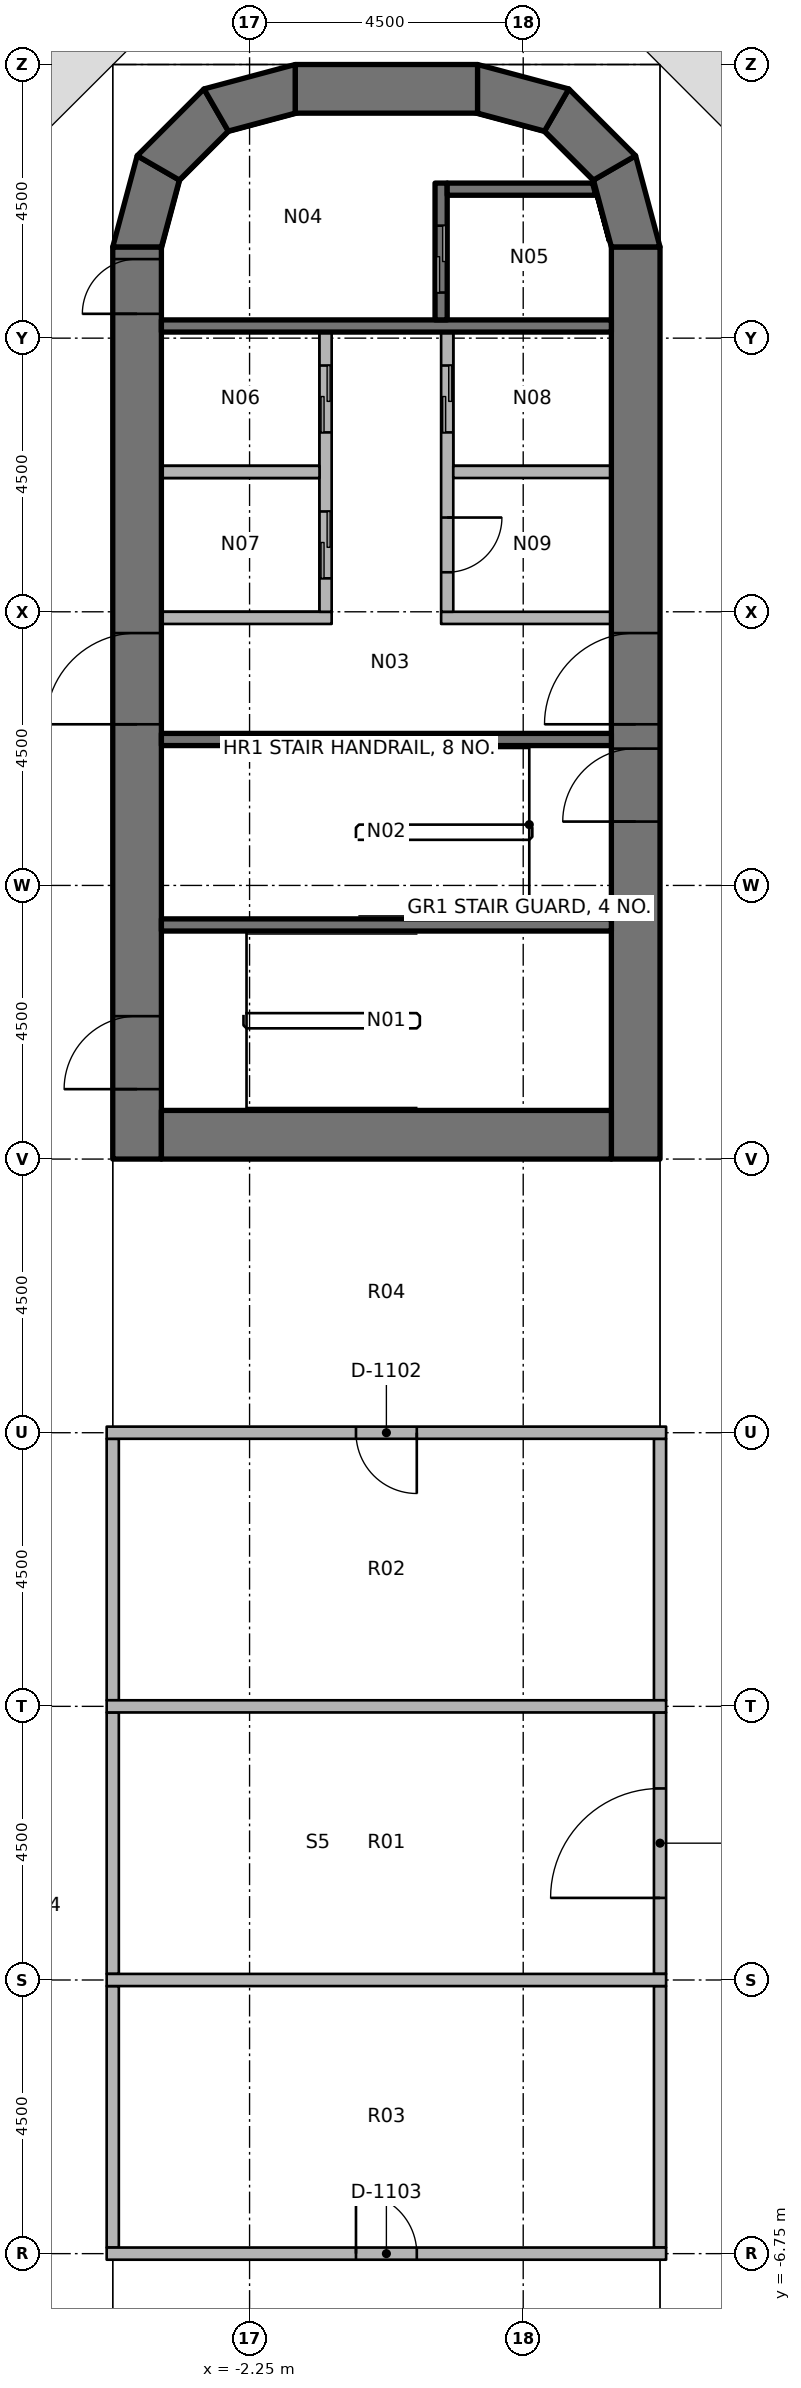
"""IFC4 building model, lengths in metres.
Left out: names, types, materials, properties, quantities, classifications, styles, units other than length and angle.
Written with IfcOpenShell. Run it as: python <this file> out.ifc"""

import sys

from ifc_helpers import new_model, si_unit, direction, frame, frame_2d, origin, place, context, subcontext, project, spatial, polyline, rectangle, outline, extrude, element, fill, save


model = new_model("IFC4")
c1 = context("Model", 3, precision=1e-05, world=origin(), true_north=direction((0.0, 1.0)))
c2 = subcontext(c1, "Body", "Model", "MODEL_VIEW")
j1 = project(units=[si_unit("LENGTHUNIT", "METRE"), si_unit("PLANEANGLEUNIT", "RADIAN")], contexts=[c1])
p1 = place(None, origin())
s1 = spatial("IfcSite", under=j1, at=p1, CompositionType="ELEMENT")
p2 = place(p1, origin())
s2 = spatial("IfcBuilding", under=s1, at=p2, CompositionType="ELEMENT")
p3 = place(p2, frame((0.0, 0.0, 124.6)))
s3 = spatial("IfcBuildingStorey", under=s2, at=p3, CompositionType="ELEMENT", Elevation=124.6)
p4 = place(p3, frame((-4.1, 11.25, 0.0), z_axis=(0.0, 0.0, 1.0), x_axis=(0.0, 1.0, 0.0)))
e1 = element("IfcWall", 1, at=p4, inside=s3, PredefinedType="SHEAR", context=c2, shape_type="SweptSolid", body=[
    extrude(rectangle(XDim=15.0, YDim=0.8, at=frame_2d((7.5, 0.0))), origin(), (0.0, 0.0, 1.0), 3.8),
])
p5 = place(p4, frame((7.15, 0.0, 0.0)))
e2 = element("IfcOpeningElement", 2, at=p5, cuts=e1, PredefinedType="OPENING", context=c2, shape_type="SweptSolid", body=[
    extrude(rectangle(XDim=1.5, YDim=2.3, at=frame_2d((0.75, 1.15))), frame((0.0, 0.41, 0.0), z_axis=(0.0, -1.0, 0.0), x_axis=(1.0, 0.0, 0.0)), (0.0, 0.0, 1.0), 0.82),
])
p6 = place(p4, frame((13.9, 0.0, 0.0)))
e3 = element("IfcOpeningElement", 3, at=p6, cuts=e1, PredefinedType="OPENING", context=c2, shape_type="SweptSolid", body=[
    extrude(rectangle(XDim=0.9, YDim=2.1, at=frame_2d((0.45, 1.05))), frame((0.0, 0.41, 0.0), z_axis=(0.0, -1.0, 0.0), x_axis=(1.0, 0.0, 0.0)), (0.0, 0.0, 1.0), 0.82),
])
p7 = place(p4, frame((1.15, 0.0, 0.0)))
e4 = element("IfcOpeningElement", 4, at=p7, cuts=e1, PredefinedType="OPENING", context=c2, shape_type="SweptSolid", body=[
    extrude(rectangle(XDim=1.2, YDim=2.1, at=frame_2d((0.6, 1.05))), frame((0.0, 0.41, 0.0), z_axis=(0.0, -1.0, 0.0), x_axis=(1.0, 0.0, 0.0)), (0.0, 0.0, 1.0), 0.82),
])
p8 = place(p3, frame((4.1, 11.25, 0.0), z_axis=(0.0, 0.0, 1.0), x_axis=(0.0, 1.0, 0.0)))
e5 = element("IfcWall", 5, at=p8, inside=s3, PredefinedType="SHEAR", context=c2, shape_type="SweptSolid", body=[
    extrude(rectangle(XDim=15.0, YDim=0.8, at=frame_2d((7.5, 0.0))), origin(), (0.0, 0.0, 1.0), 3.8),
])
p9 = place(p8, frame((7.15, 0.0, 0.0)))
e6 = element("IfcOpeningElement", 6, at=p9, cuts=e5, PredefinedType="OPENING", context=c2, shape_type="SweptSolid", body=[
    extrude(rectangle(XDim=1.5, YDim=2.3, at=frame_2d((0.75, 1.15))), frame((0.0, 0.41, 0.0), z_axis=(0.0, -1.0, 0.0), x_axis=(1.0, 0.0, 0.0)), (0.0, 0.0, 1.0), 0.82),
])
p10 = place(p8, frame((5.55, 0.0, 0.0)))
e7 = element("IfcOpeningElement", 7, at=p10, cuts=e5, PredefinedType="OPENING", context=c2, shape_type="SweptSolid", body=[
    extrude(rectangle(XDim=1.2, YDim=2.1, at=frame_2d((0.6, 1.05))), frame((0.0, 0.41, 0.0), z_axis=(0.0, -1.0, 0.0), x_axis=(1.0, 0.0, 0.0)), (0.0, 0.0, 1.0), 0.82),
])
p11 = place(p3, frame((-3.7, 11.65, 0.0), z_axis=(0.0, 0.0, 1.0), x_axis=(1.0, 0.0, 0.0)))
e8 = element("IfcWall", 8, at=p11, inside=s3, PredefinedType="SHEAR", context=c2, shape_type="SweptSolid", body=[
    extrude(rectangle(XDim=7.4, YDim=0.8, at=frame_2d((3.7, 0.0))), origin(), (0.0, 0.0, 1.0), 3.8),
])
p12 = place(p3, frame((-1.5, 28.85, 0.0), z_axis=(0.0, 0.0, 1.0), x_axis=(1.0, 0.0, 0.0)))
e9 = element("IfcWall", 9, at=p12, inside=s3, PredefinedType="SHEAR", context=c2, shape_type="SweptSolid", body=[
    extrude(rectangle(XDim=3.0, YDim=0.8, at=frame_2d((1.5, 0.0))), origin(), (0.0, 0.0, 1.0), 3.8),
])
p13 = place(p3, origin())
e10 = element("IfcWall", 10, at=p13, inside=s3, PredefinedType="SHEAR", context=c2, shape_type="SweptSolid", body=[
    extrude(outline(polyline([(-4.5, 26.25), (-4.098, 27.75), (-3.405, 27.35), (-3.7, 26.25), (-4.5, 26.25)])), origin(), (0.0, 0.0, 1.0), 3.8),
])
p14 = place(p3, origin())
e11 = element("IfcWall", 11, at=p14, inside=s3, PredefinedType="SHEAR", context=c2, shape_type="SweptSolid", body=[
    extrude(outline(polyline([(-4.098, 27.75), (-3.0, 28.848), (-2.6, 28.155), (-3.405, 27.35), (-4.098, 27.75)])), origin(), (0.0, 0.0, 1.0), 3.8),
])
p15 = place(p3, origin())
e12 = element("IfcWall", 12, at=p15, inside=s3, PredefinedType="SHEAR", context=c2, shape_type="SweptSolid", body=[
    extrude(outline(polyline([(-3.0, 28.848), (-1.5, 29.25), (-1.5, 28.45), (-2.6, 28.155), (-3.0, 28.848)])), origin(), (0.0, 0.0, 1.0), 3.8),
])
p16 = place(p3, origin())
e13 = element("IfcWall", 13, at=p16, inside=s3, PredefinedType="SHEAR", context=c2, shape_type="SweptSolid", body=[
    extrude(outline(polyline([(4.5, 26.25), (4.098, 27.75), (3.405, 27.35), (3.7, 26.25), (4.5, 26.25)])), origin(), (0.0, 0.0, 1.0), 3.8),
])
p17 = place(p3, origin())
e14 = element("IfcWall", 14, at=p17, inside=s3, PredefinedType="SHEAR", context=c2, shape_type="SweptSolid", body=[
    extrude(outline(polyline([(4.098, 27.75), (3.0, 28.848), (2.6, 28.155), (3.405, 27.35), (4.098, 27.75)])), origin(), (0.0, 0.0, 1.0), 3.8),
])
p18 = place(p3, origin())
e15 = element("IfcWall", 15, at=p18, inside=s3, PredefinedType="SHEAR", context=c2, shape_type="SweptSolid", body=[
    extrude(outline(polyline([(3.0, 28.848), (1.5, 29.25), (1.5, 28.45), (2.6, 28.155), (3.0, 28.848)])), origin(), (0.0, 0.0, 1.0), 3.8),
])
p19 = place(p3, frame((-3.7, 24.95, 0.0), z_axis=(0.0, 0.0, 1.0), x_axis=(1.0, 0.0, 0.0)))
e16 = element("IfcWall", 16, at=p19, inside=s3, PredefinedType="SHEAR", context=c2, shape_type="SweptSolid", body=[
    extrude(rectangle(XDim=7.4, YDim=0.2, at=frame_2d((3.7, 0.0))), origin(), (0.0, 0.0, 1.0), 3.65),
])
p20 = place(p3, frame((0.9, 27.3, 0.0), z_axis=(0.0, 0.0, 1.0), x_axis=(0.0, -1.0, 0.0)))
e17 = element("IfcWall", 17, at=p20, inside=s3, PredefinedType="SHEAR", context=c2, shape_type="SweptSolid", body=[
    extrude(rectangle(XDim=2.25, YDim=0.2, at=frame_2d((1.125, 0.0))), origin(), (0.0, 0.0, 1.0), 3.65),
])
p21 = place(p20, frame((0.7, 0.0, 0.0)))
e18 = element("IfcOpeningElement", 18, at=p21, cuts=e17, PredefinedType="OPENING", context=c2, shape_type="SweptSolid", body=[
    extrude(rectangle(XDim=1.1, YDim=2.3, at=frame_2d((0.55, 1.15))), frame((0.0, 0.11, 0.0), z_axis=(0.0, -1.0, 0.0), x_axis=(1.0, 0.0, 0.0)), (0.0, 0.0, 1.0), 0.22),
])
p22 = place(p3, origin())
e19 = element("IfcWall", 19, at=p22, inside=s3, PredefinedType="SHEAR", context=c2, shape_type="SweptSolid", body=[
    extrude(outline(polyline([(1.0, 27.1), (3.444, 27.1), (3.39, 27.3), (1.0, 27.3), (1.0, 27.1)])), origin(), (0.0, 0.0, 1.0), 3.65),
])
for number, where, z_axis, x_axis in (
    (20, (-3.7, 18.15, 0.0), (0.0, 0.0, 1.0), (1.0, 0.0, 0.0)),
    (21, (-3.7, 15.1, 0.0), (0.0, 0.0, 1.0), (1.0, 0.0, 0.0)),
):
    element("IfcWall", number, at=place(p3, frame(where, z_axis=z_axis, x_axis=x_axis)), inside=s3, PredefinedType="SHEAR", context=c2, shape_type="SweptSolid", body=[
        extrude(rectangle(XDim=7.4, YDim=0.2, at=frame_2d((3.7, 0.0))), origin(), (0.0, 0.0, 1.0), 3.65),
    ])
p23 = place(p3, frame((-3.7, 20.15, 0.0), z_axis=(0.0, 0.0, 1.0), x_axis=(1.0, 0.0, 0.0)))
e22 = element("IfcWall", 22, at=p23, inside=s3, PredefinedType="PARTITIONING", context=c2, shape_type="SweptSolid", body=[
    extrude(rectangle(XDim=2.8, YDim=0.2, at=frame_2d((1.4, 0.0))), origin(), (0.0, 0.0, 1.0), 3.65),
])
p24 = place(p3, frame((-1.0, 24.85, 0.0), z_axis=(0.0, 0.0, 1.0), x_axis=(0.0, -1.0, 0.0)))
e23 = element("IfcWall", 23, at=p24, inside=s3, PredefinedType="PARTITIONING", context=c2, shape_type="SweptSolid", body=[
    extrude(rectangle(XDim=4.6, YDim=0.2, at=frame_2d((2.3, 0.0))), origin(), (0.0, 0.0, 1.0), 3.65),
])
p25 = place(p24, frame((0.55, 0.0, 0.0)))
e24 = element("IfcOpeningElement", 24, at=p25, cuts=e23, PredefinedType="OPENING", context=c2, shape_type="SweptSolid", body=[
    extrude(rectangle(XDim=1.1, YDim=2.3, at=frame_2d((0.55, 1.15))), frame((0.0, 0.11, 0.0), z_axis=(0.0, -1.0, 0.0), x_axis=(1.0, 0.0, 0.0)), (0.0, 0.0, 1.0), 0.22),
])
p26 = place(p24, frame((2.95, 0.0, 0.0)))
e25 = element("IfcOpeningElement", 25, at=p26, cuts=e23, PredefinedType="OPENING", context=c2, shape_type="SweptSolid", body=[
    extrude(rectangle(XDim=1.1, YDim=2.3, at=frame_2d((0.55, 1.15))), frame((0.0, 0.11, 0.0), z_axis=(0.0, -1.0, 0.0), x_axis=(1.0, 0.0, 0.0)), (0.0, 0.0, 1.0), 0.22),
])
p27 = place(p3, frame((0.9, 20.15, 0.0), z_axis=(0.0, 0.0, 1.0), x_axis=(1.0, 0.0, 0.0)))
e26 = element("IfcWall", 26, at=p27, inside=s3, PredefinedType="PARTITIONING", context=c2, shape_type="SweptSolid", body=[
    extrude(rectangle(XDim=2.8, YDim=0.2, at=frame_2d((1.4, 0.0))), origin(), (0.0, 0.0, 1.0), 3.65),
])
p28 = place(p3, frame((1.0, 24.85, 0.0), z_axis=(0.0, 0.0, 1.0), x_axis=(0.0, -1.0, 0.0)))
e27 = element("IfcWall", 27, at=p28, inside=s3, PredefinedType="PARTITIONING", context=c2, shape_type="SweptSolid", body=[
    extrude(rectangle(XDim=4.6, YDim=0.2, at=frame_2d((2.3, 0.0))), origin(), (0.0, 0.0, 1.0), 3.65),
])
p29 = place(p28, frame((0.55, 0.0, 0.0)))
e28 = element("IfcOpeningElement", 28, at=p29, cuts=e27, PredefinedType="OPENING", context=c2, shape_type="SweptSolid", body=[
    extrude(rectangle(XDim=1.1, YDim=2.3, at=frame_2d((0.55, 1.15))), frame((0.0, 0.11, 0.0), z_axis=(0.0, -1.0, 0.0), x_axis=(1.0, 0.0, 0.0)), (0.0, 0.0, 1.0), 0.22),
])
p30 = place(p28, frame((3.05, 0.0, 0.0)))
e29 = element("IfcOpeningElement", 29, at=p30, cuts=e27, PredefinedType="OPENING", context=c2, shape_type="SweptSolid", body=[
    extrude(rectangle(XDim=0.9, YDim=2.1, at=frame_2d((0.45, 1.05))), frame((0.0, 0.11, 0.0), z_axis=(0.0, -1.0, 0.0), x_axis=(1.0, 0.0, 0.0)), (0.0, 0.0, 1.0), 0.22),
])
for number, where, z_axis, x_axis in (
    (30, (-3.7, 22.55, 0.0), (0.0, 0.0, 1.0), (1.0, 0.0, 0.0)),
    (31, (1.1, 22.55, 0.0), (0.0, 0.0, 1.0), (1.0, 0.0, 0.0)),
):
    element("IfcWall", number, at=place(p3, frame(where, z_axis=z_axis, x_axis=x_axis)), inside=s3, PredefinedType="PARTITIONING", context=c2, shape_type="SweptSolid", body=[
        extrude(rectangle(XDim=2.6, YDim=0.2, at=frame_2d((1.3, 0.0))), origin(), (0.0, 0.0, 1.0), 3.65),
    ])
for number, where, z_axis, x_axis in (
    (32, (-4.5, 2.35, 0.0), (0.0, 0.0, 1.0), (0.0, 1.0, 0.0)),
    (33, (-4.5, -2.15, 0.0), (0.0, 0.0, 1.0), (0.0, 1.0, 0.0)),
    (34, (-4.5, -6.65, 0.0), (0.0, 0.0, 1.0), (0.0, 1.0, 0.0)),
    (35, (4.5, 2.35, 0.0), (0.0, 0.0, 1.0), (0.0, 1.0, 0.0)),
):
    element("IfcWall", number, at=place(p3, frame(where, z_axis=z_axis, x_axis=x_axis)), inside=s3, PredefinedType="PARTITIONING", context=c2, shape_type="SweptSolid", body=[
        extrude(rectangle(XDim=4.3, YDim=0.2, at=frame_2d((2.15, 0.0))), origin(), (0.0, 0.0, 1.0), 2.738),
    ])
p31 = place(p3, frame((4.5, -2.15, 0.0), z_axis=(0.0, 0.0, 1.0), x_axis=(0.0, 1.0, 0.0)))
e36 = element("IfcWall", 36, at=p31, inside=s3, PredefinedType="PARTITIONING", context=c2, shape_type="SweptSolid", body=[
    extrude(rectangle(XDim=4.3, YDim=0.2, at=frame_2d((2.15, 0.0))), origin(), (0.0, 0.0, 1.0), 2.738),
])
p32 = place(p31, frame((1.25, 0.0, 0.0)))
e37 = element("IfcOpeningElement", 37, at=p32, cuts=e36, PredefinedType="OPENING", context=c2, shape_type="SweptSolid", body=[
    extrude(rectangle(XDim=1.8, YDim=2.1, at=frame_2d((0.9, 1.05))), frame((0.0, 0.11, 0.0), z_axis=(0.0, -1.0, 0.0), x_axis=(1.0, 0.0, 0.0)), (0.0, 0.0, 1.0), 0.22),
])
p33 = place(p3, frame((4.5, -6.65, 0.0), z_axis=(0.0, 0.0, 1.0), x_axis=(0.0, 1.0, 0.0)))
e38 = element("IfcWall", 38, at=p33, inside=s3, PredefinedType="PARTITIONING", context=c2, shape_type="SweptSolid", body=[
    extrude(rectangle(XDim=4.3, YDim=0.2, at=frame_2d((2.15, 0.0))), origin(), (0.0, 0.0, 1.0), 2.738),
])
p34 = place(p3, frame((4.6, 6.75, 0.0), z_axis=(0.0, 0.0, 1.0), x_axis=(-1.0, 0.0, 0.0)))
e39 = element("IfcWall", 39, at=p34, inside=s3, PredefinedType="PARTITIONING", context=c2, shape_type="SweptSolid", body=[
    extrude(rectangle(XDim=9.2, YDim=0.2, at=frame_2d((4.6, 0.0))), origin(), (0.0, 0.0, 1.0), 2.738),
])
p35 = place(p34, frame((4.1, 0.0, 0.0)))
e40 = element("IfcOpeningElement", 40, at=p35, cuts=e39, PredefinedType="OPENING", context=c2, shape_type="SweptSolid", body=[
    extrude(rectangle(XDim=1.0, YDim=2.1, at=frame_2d((0.5, 1.05))), frame((0.0, 0.11, 0.0), z_axis=(0.0, -1.0, 0.0), x_axis=(1.0, 0.0, 0.0)), (0.0, 0.0, 1.0), 0.22),
])
p36 = place(p3, frame((-4.6, -6.75, 0.0), z_axis=(0.0, 0.0, 1.0), x_axis=(1.0, 0.0, 0.0)))
e41 = element("IfcWall", 41, at=p36, inside=s3, PredefinedType="PARTITIONING", context=c2, shape_type="SweptSolid", body=[
    extrude(rectangle(XDim=9.2, YDim=0.2, at=frame_2d((4.6, 0.0))), origin(), (0.0, 0.0, 1.0), 2.738),
])
p37 = place(p36, frame((4.1, 0.0, 0.0)))
e42 = element("IfcOpeningElement", 42, at=p37, cuts=e41, PredefinedType="OPENING", context=c2, shape_type="SweptSolid", body=[
    extrude(rectangle(XDim=1.0, YDim=2.1, at=frame_2d((0.5, 1.05))), frame((0.0, 0.11, 0.0), z_axis=(0.0, -1.0, 0.0), x_axis=(1.0, 0.0, 0.0)), (0.0, 0.0, 1.0), 0.22),
])
for number, where, z_axis, x_axis in (
    (43, (-4.6, 2.25, 0.0), (0.0, 0.0, 1.0), (1.0, 0.0, 0.0)),
    (44, (-4.6, -2.25, 0.0), (0.0, 0.0, 1.0), (1.0, 0.0, 0.0)),
):
    element("IfcWall", number, at=place(p3, frame(where, z_axis=z_axis, x_axis=x_axis)), inside=s3, PredefinedType="PARTITIONING", context=c2, shape_type="SweptSolid", body=[
        extrude(rectangle(XDim=9.2, YDim=0.2, at=frame_2d((4.6, 0.0))), origin(), (0.0, 0.0, 1.0), 2.738),
    ])
p38 = place(p5, origin())
e45 = element("IfcDoor", 45, at=p38, inside=s3, OperationType="DOUBLE_DOOR_SINGLE_SWING", PredefinedType="DOOR", context=c2, shape_type="SweptSolid", body=[
    extrude(rectangle(XDim=1.5, YDim=2.3, at=frame_2d((0.75, 1.15))), frame((0.0, 0.025, 0.0), z_axis=(0.0, -1.0, 0.0), x_axis=(1.0, 0.0, 0.0)), (0.0, 0.0, 1.0), 0.05),
])
fill(e2, e45)
p39 = place(p9, origin())
e46 = element("IfcDoor", 46, at=p39, inside=s3, OperationType="DOUBLE_DOOR_SINGLE_SWING", PredefinedType="DOOR", context=c2, shape_type="SweptSolid", body=[
    extrude(rectangle(XDim=1.5, YDim=2.3, at=frame_2d((0.75, 1.15))), frame((0.0, 0.025, 0.0), z_axis=(0.0, -1.0, 0.0), x_axis=(1.0, 0.0, 0.0)), (0.0, 0.0, 1.0), 0.05),
])
fill(e6, e46)
p40 = place(p6, origin())
e47 = element("IfcDoor", 47, at=p40, inside=s3, OperationType="SINGLE_SWING_RIGHT", PredefinedType="DOOR", context=c2, shape_type="SweptSolid", body=[
    extrude(rectangle(XDim=0.9, YDim=2.1, at=frame_2d((0.45, 1.05))), frame((0.0, 0.025, 0.0), z_axis=(0.0, -1.0, 0.0), x_axis=(1.0, 0.0, 0.0)), (0.0, 0.0, 1.0), 0.05),
])
fill(e3, e47)
p41 = place(p10, origin())
e48 = element("IfcDoor", 48, at=p41, inside=s3, OperationType="SINGLE_SWING_RIGHT", PredefinedType="DOOR", context=c2, shape_type="SweptSolid", body=[
    extrude(rectangle(XDim=1.2, YDim=2.1, at=frame_2d((0.6, 1.05))), frame((0.0, 0.025, 0.0), z_axis=(0.0, -1.0, 0.0), x_axis=(1.0, 0.0, 0.0)), (0.0, 0.0, 1.0), 0.05),
])
fill(e7, e48)
p42 = place(p7, origin())
e49 = element("IfcDoor", 49, at=p42, inside=s3, OperationType="SINGLE_SWING_LEFT", PredefinedType="DOOR", context=c2, shape_type="SweptSolid", body=[
    extrude(rectangle(XDim=1.2, YDim=2.1, at=frame_2d((0.6, 1.05))), frame((0.0, 0.025, 0.0), z_axis=(0.0, -1.0, 0.0), x_axis=(1.0, 0.0, 0.0)), (0.0, 0.0, 1.0), 0.05),
])
fill(e4, e49)
p43 = place(p21, origin())
e50 = element("IfcDoor", 50, at=p43, inside=s3, OperationType="DOUBLE_DOOR_SLIDING", PredefinedType="DOOR", context=c2, shape_type="SweptSolid", body=[
    extrude(rectangle(XDim=1.1, YDim=2.3, at=frame_2d((0.55, 1.15))), frame((0.0, 0.025, 0.0), z_axis=(0.0, -1.0, 0.0), x_axis=(1.0, 0.0, 0.0)), (0.0, 0.0, 1.0), 0.05),
])
fill(e18, e50)
p44 = place(p25, origin())
e51 = element("IfcDoor", 51, at=p44, inside=s3, OperationType="DOUBLE_DOOR_SLIDING", PredefinedType="DOOR", context=c2, shape_type="SweptSolid", body=[
    extrude(rectangle(XDim=1.1, YDim=2.3, at=frame_2d((0.55, 1.15))), frame((0.0, 0.025, 0.0), z_axis=(0.0, -1.0, 0.0), x_axis=(1.0, 0.0, 0.0)), (0.0, 0.0, 1.0), 0.05),
])
fill(e24, e51)
p45 = place(p26, origin())
e52 = element("IfcDoor", 52, at=p45, inside=s3, OperationType="DOUBLE_DOOR_SLIDING", PredefinedType="DOOR", context=c2, shape_type="SweptSolid", body=[
    extrude(rectangle(XDim=1.1, YDim=2.3, at=frame_2d((0.55, 1.15))), frame((0.0, 0.025, 0.0), z_axis=(0.0, -1.0, 0.0), x_axis=(1.0, 0.0, 0.0)), (0.0, 0.0, 1.0), 0.05),
])
fill(e25, e52)
p46 = place(p29, origin())
e53 = element("IfcDoor", 53, at=p46, inside=s3, OperationType="DOUBLE_DOOR_SLIDING", PredefinedType="DOOR", context=c2, shape_type="SweptSolid", body=[
    extrude(rectangle(XDim=1.1, YDim=2.3, at=frame_2d((0.55, 1.15))), frame((0.0, 0.025, 0.0), z_axis=(0.0, -1.0, 0.0), x_axis=(1.0, 0.0, 0.0)), (0.0, 0.0, 1.0), 0.05),
])
fill(e28, e53)
p47 = place(p30, origin())
e54 = element("IfcDoor", 54, at=p47, inside=s3, OperationType="SINGLE_SWING_RIGHT", PredefinedType="DOOR", context=c2, shape_type="SweptSolid", body=[
    extrude(rectangle(XDim=0.9, YDim=2.1, at=frame_2d((0.45, 1.05))), frame((0.0, 0.025, 0.0), z_axis=(0.0, -1.0, 0.0), x_axis=(1.0, 0.0, 0.0)), (0.0, 0.0, 1.0), 0.05),
])
fill(e29, e54)
p48 = place(p32, origin())
e55 = element("IfcDoor", 55, at=p48, inside=s3, OperationType="DOUBLE_DOOR_SINGLE_SWING", PredefinedType="DOOR", context=c2, shape_type="SweptSolid", body=[
    extrude(rectangle(XDim=1.8, YDim=2.1, at=frame_2d((0.9, 1.05))), frame((0.0, 0.025, 0.0), z_axis=(0.0, -1.0, 0.0), x_axis=(1.0, 0.0, 0.0)), (0.0, 0.0, 1.0), 0.05),
])
fill(e37, e55)
p49 = place(p35, origin())
e56 = element("IfcDoor", 56, at=p49, inside=s3, OperationType="SINGLE_SWING_RIGHT", PredefinedType="DOOR", context=c2, shape_type="SweptSolid", body=[
    extrude(rectangle(XDim=1.0, YDim=2.1, at=frame_2d((0.5, 1.05))), frame((0.0, 0.025, 0.0), z_axis=(0.0, -1.0, 0.0), x_axis=(1.0, 0.0, 0.0)), (0.0, 0.0, 1.0), 0.05),
])
fill(e40, e56)
p50 = place(p37, origin())
e57 = element("IfcDoor", 57, at=p50, inside=s3, OperationType="SINGLE_SWING_RIGHT", PredefinedType="DOOR", context=c2, shape_type="SweptSolid", body=[
    extrude(rectangle(XDim=1.0, YDim=2.1, at=frame_2d((0.5, 1.05))), frame((0.0, 0.025, 0.0), z_axis=(0.0, -1.0, 0.0), x_axis=(1.0, 0.0, 0.0)), (0.0, 0.0, 1.0), 0.05),
])
fill(e42, e57)
save(model, sys.argv[1])
